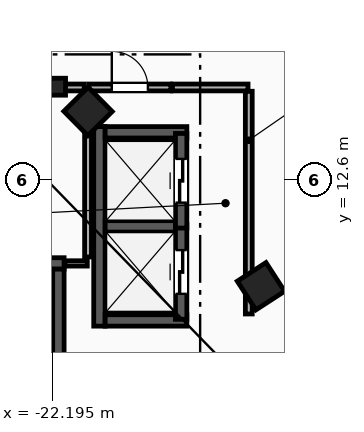
"""IFC4 building model, lengths in metres.
Left out: names, types, materials, properties, quantities, classifications, styles, units other than length and angle.
Written with IfcOpenShell. Run it as: python <this file> out.ifc"""

import sys

from ifc_helpers import new_model, si_unit, direction, frame, frame_2d, origin, origin_2d, place, context, subcontext, project, spatial, rectangle, i_section, extrude, element, fill, save


model = new_model("IFC4")
c1 = context("Model", 3, precision=1e-05, world=origin(), true_north=direction((0.0, 1.0)))
c2 = subcontext(c1, "Body", "Model", "MODEL_VIEW")
j1 = project(units=[si_unit("LENGTHUNIT", "METRE"), si_unit("PLANEANGLEUNIT", "RADIAN")], contexts=[c1])
p1 = place(None, origin())
s1 = spatial("IfcSite", under=j1, at=p1, CompositionType="ELEMENT")
p2 = place(p1, origin())
s2 = spatial("IfcBuilding", under=s1, at=p2, CompositionType="ELEMENT")
p3 = place(p2, frame((0.0, 0.0, 231.4)))
s3 = spatial("IfcBuildingStorey", under=s2, at=p3, CompositionType="ELEMENT", Elevation=231.4)
p4 = place(p3, frame((-22.05, 15.05, 0.0), z_axis=(0.0, 0.0, 1.0), x_axis=(1.0, 0.0, 0.0)))
e1 = element("IfcColumn", 1, at=p4, inside=s3, PredefinedType="COLUMN", context=c2, shape_type="SweptSolid", body=[
    extrude(i_section(OverallWidth=0.416, OverallDepth=0.446, WebThickness=0.039, FlangeThickness=0.063, FilletRadius=0.018, at=origin_2d()), origin(), (0.0, 0.0, 1.0), 3.6),
])
for number, where, z_axis, x_axis in (
    (2, (-16.7, 9.8, 0.0), (0.0, 0.0, 1.0), (-0.544, 0.839, 0.0)),
    (3, (-21.25, 14.4, 0.0), (0.0, 0.0, 1.0), (-0.703, 0.711, 0.0)),
):
    element("IfcColumn", number, at=place(p3, frame(where, z_axis=z_axis, x_axis=x_axis)), inside=s3, PredefinedType="COLUMN", context=c2, shape_type="SweptSolid", body=[
        extrude(rectangle(XDim=0.9, YDim=0.9, at=origin_2d()), origin(), (0.0, 0.0, 1.0), 3.6),
    ])
p5 = place(p3, frame((-23.98, 10.4, 0.0), z_axis=(0.0, 0.0, 1.0), x_axis=(1.0, 0.0, 0.0)))
e4 = element("IfcWall", 4, at=p5, inside=s3, PredefinedType="SHEAR", context=c2, shape_type="SweptSolid", body=[
    extrude(rectangle(XDim=2.1, YDim=0.3, at=frame_2d((1.05, 0.0))), origin(), (0.0, 0.0, 1.0), 3.32),
])
p6 = place(p3, frame((-22.03, 7.75, 0.0), z_axis=(0.0, 0.0, 1.0), x_axis=(0.0, 1.0, 0.0)))
e5 = element("IfcWall", 5, at=p6, inside=s3, PredefinedType="SHEAR", context=c2, shape_type="SweptSolid", body=[
    extrude(rectangle(XDim=2.5, YDim=0.3, at=frame_2d((1.25, 0.0))), origin(), (0.0, 0.0, 1.0), 3.32),
])
p7 = place(p3, frame((-20.95, 8.75, 0.0), z_axis=(0.0, 0.0, 1.0), x_axis=(0.0, 1.0, 0.0)))
e6 = element("IfcWall", 6, at=p7, inside=s3, PredefinedType="SHEAR", context=c2, shape_type="SweptSolid", body=[
    extrude(rectangle(XDim=5.25, YDim=0.3, at=frame_2d((2.625, 0.0))), origin(), (0.0, 0.0, 1.0), 3.32),
])
for number, where, z_axis, x_axis in (
    (7, (-20.8, 8.9, 0.0), (0.0, 0.0, 1.0), (1.0, 0.0, 0.0)),
    (8, (-20.8, 13.85, 0.0), (0.0, 0.0, 1.0), (1.0, 0.0, 0.0)),
):
    element("IfcWall", number, at=place(p3, frame(where, z_axis=z_axis, x_axis=x_axis)), inside=s3, PredefinedType="SHEAR", context=c2, shape_type="SweptSolid", body=[
        extrude(rectangle(XDim=2.15, YDim=0.3, at=frame_2d((1.075, 0.0))), origin(), (0.0, 0.0, 1.0), 3.32),
    ])
p8 = place(p3, frame((-20.8, 11.375, 0.0), z_axis=(0.0, 0.0, 1.0), x_axis=(1.0, 0.0, 0.0)))
e9 = element("IfcWall", 9, at=p8, inside=s3, PredefinedType="SHEAR", context=c2, shape_type="SweptSolid", body=[
    extrude(rectangle(XDim=1.85, YDim=0.3, at=frame_2d((0.925, 0.0))), origin(), (0.0, 0.0, 1.0), 3.32),
])
p9 = place(p3, frame((-18.8, 8.93, 0.0), z_axis=(0.0, 0.0, 1.0), x_axis=(0.0, 1.0, 0.0)))
e10 = element("IfcWall", 10, at=p9, inside=s3, PredefinedType="SHEAR", context=c2, shape_type="SweptSolid", body=[
    extrude(rectangle(XDim=2.49, YDim=0.3, at=frame_2d((1.245, 0.0))), origin(), (0.0, 0.0, 1.0), 3.32),
])
p10 = place(p9, frame((0.67, 0.0, 0.0)))
e11 = element("IfcOpeningElement", 11, at=p10, cuts=e10, PredefinedType="OPENING", context=c2, shape_type="SweptSolid", body=[
    extrude(rectangle(XDim=1.15, YDim=2.2, at=frame_2d((0.575, 1.1))), frame((0.0, 0.16, 0.0), z_axis=(0.0, -1.0, 0.0), x_axis=(1.0, 0.0, 0.0)), (0.0, 0.0, 1.0), 0.32),
])
p11 = place(p3, frame((-18.8, 11.33, 0.0), z_axis=(0.0, 0.0, 1.0), x_axis=(0.0, 1.0, 0.0)))
e12 = element("IfcWall", 12, at=p11, inside=s3, PredefinedType="SHEAR", context=c2, shape_type="SweptSolid", body=[
    extrude(rectangle(XDim=2.49, YDim=0.3, at=frame_2d((1.245, 0.0))), origin(), (0.0, 0.0, 1.0), 3.32),
])
p12 = place(p11, frame((0.67, 0.0, 0.0)))
e13 = element("IfcOpeningElement", 13, at=p12, cuts=e12, PredefinedType="OPENING", context=c2, shape_type="SweptSolid", body=[
    extrude(rectangle(XDim=1.15, YDim=2.2, at=frame_2d((0.575, 1.1))), frame((0.0, 0.16, 0.0), z_axis=(0.0, -1.0, 0.0), x_axis=(1.0, 0.0, 0.0)), (0.0, 0.0, 1.0), 0.32),
])
p13 = place(p3, frame((-17.02, 9.07, 0.0), z_axis=(0.0, 0.0, 1.0), x_axis=(0.0, 1.0, 0.0)))
e14 = element("IfcWall", 14, at=p13, inside=s3, PredefinedType="PARTITIONING", context=c2, shape_type="SweptSolid", body=[
    extrude(rectangle(XDim=5.86, YDim=0.18, at=frame_2d((2.93, 0.0))), origin(), (0.0, 0.0, 1.0), 3.32),
])
p14 = place(p3, frame((-21.23, 15.03, 0.0), z_axis=(0.0, 0.0, 1.0), x_axis=(1.0, 0.0, 0.0)))
e15 = element("IfcWall", 15, at=p14, inside=s3, PredefinedType="PARTITIONING", context=c2, shape_type="SweptSolid", body=[
    extrude(rectangle(XDim=2.16, YDim=0.18, at=frame_2d((1.08, 0.0))), origin(), (0.0, 0.0, 1.0), 3.32),
])
p15 = place(p14, frame((0.605, 0.0, 0.0)))
e16 = element("IfcOpeningElement", 16, at=p15, cuts=e15, PredefinedType="OPENING", context=c2, shape_type="SweptSolid", body=[
    extrude(rectangle(XDim=0.95, YDim=2.1, at=frame_2d((0.475, 1.05))), frame((0.0, 0.1, 0.0), z_axis=(0.0, -1.0, 0.0), x_axis=(1.0, 0.0, 0.0)), (0.0, 0.0, 1.0), 0.2),
])
p16 = place(p3, frame((-19.03, 15.03, 0.0), z_axis=(0.0, 0.0, 1.0), x_axis=(1.0, 0.0, 0.0)))
e17 = element("IfcWall", 17, at=p16, inside=s3, PredefinedType="PARTITIONING", context=c2, shape_type="SweptSolid", body=[
    extrude(rectangle(XDim=1.99, YDim=0.18, at=frame_2d((0.995, 0.0))), origin(), (0.0, 0.0, 1.0), 3.32),
])
p17 = place(p3, frame((-21.86, 10.4, 0.0), z_axis=(0.0, 0.0, 1.0), x_axis=(1.0, 0.0, 0.0)))
e18 = element("IfcWall", 18, at=p17, inside=s3, PredefinedType="PARTITIONING", context=c2, shape_type="SweptSolid", body=[
    extrude(rectangle(XDim=0.59, YDim=0.14, at=frame_2d((0.295, 0.0))), origin(), (0.0, 0.0, 1.0), 3.32),
])
p18 = place(p3, frame((-21.25, 10.57, 0.0), z_axis=(0.0, 0.0, 1.0), x_axis=(0.0, 1.0, 0.0)))
e19 = element("IfcWall", 19, at=p18, inside=s3, PredefinedType="PARTITIONING", context=c2, shape_type="SweptSolid", body=[
    extrude(rectangle(XDim=4.36, YDim=0.18, at=frame_2d((2.18, 0.0))), origin(), (0.0, 0.0, 1.0), 3.32),
])
p19 = place(p3, frame((-23.96, 15.03, 0.0), z_axis=(0.0, 0.0, 1.0), x_axis=(1.0, 0.0, 0.0)))
e20 = element("IfcWall", 20, at=p19, inside=s3, PredefinedType="PARTITIONING", context=c2, shape_type="SweptSolid", body=[
    extrude(rectangle(XDim=2.61, YDim=0.18, at=frame_2d((1.305, 0.0))), origin(), (0.0, 0.0, 1.0), 2.393),
])
p20 = place(p10, origin())
e21 = element("IfcDoor", 21, at=p20, inside=s3, OperationType="SLIDING_TO_LEFT", PredefinedType="TRAPDOOR", context=c2, shape_type="SweptSolid", body=[
    extrude(rectangle(XDim=1.15, YDim=2.2, at=frame_2d((0.575, 1.1))), frame((0.0, 0.025, 0.0), z_axis=(0.0, -1.0, 0.0), x_axis=(1.0, 0.0, 0.0)), (0.0, 0.0, 1.0), 0.05),
])
fill(e11, e21)
p21 = place(p12, origin())
e22 = element("IfcDoor", 22, at=p21, inside=s3, OperationType="SLIDING_TO_LEFT", PredefinedType="TRAPDOOR", context=c2, shape_type="SweptSolid", body=[
    extrude(rectangle(XDim=1.15, YDim=2.2, at=frame_2d((0.575, 1.1))), frame((0.0, 0.025, 0.0), z_axis=(0.0, -1.0, 0.0), x_axis=(1.0, 0.0, 0.0)), (0.0, 0.0, 1.0), 0.05),
])
fill(e13, e22)
p22 = place(p15, origin())
e23 = element("IfcDoor", 23, at=p22, inside=s3, OperationType="SINGLE_SWING_LEFT", PredefinedType="DOOR", context=c2, shape_type="SweptSolid", body=[
    extrude(rectangle(XDim=0.95, YDim=2.1, at=frame_2d((0.475, 1.05))), frame((0.0, 0.025, 0.0), z_axis=(0.0, -1.0, 0.0), x_axis=(1.0, 0.0, 0.0)), (0.0, 0.0, 1.0), 0.05),
])
fill(e16, e23)
save(model, sys.argv[1])
